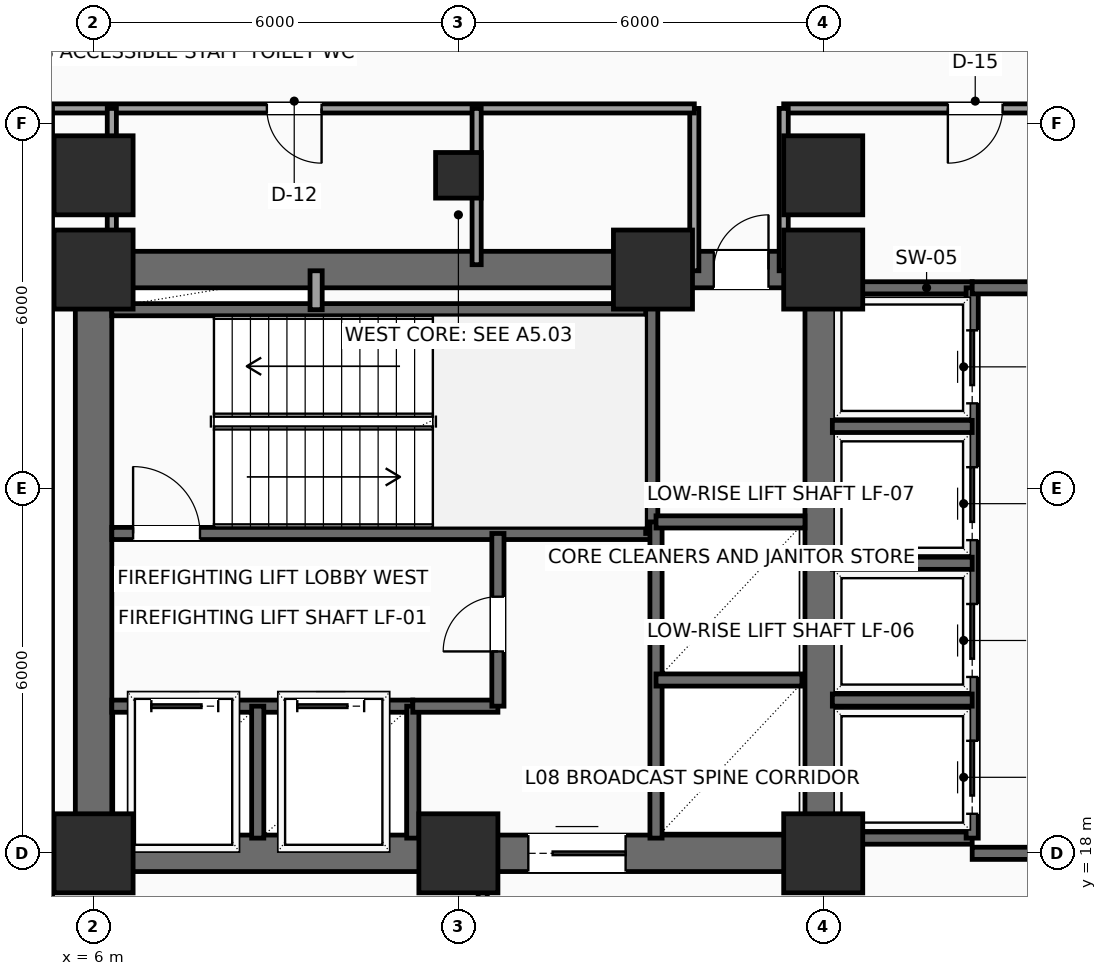
"""IFC4 building model, lengths in metres.
Left out: names, types, materials, properties, quantities, classifications, styles, units other than length and angle.
Written with IfcOpenShell. Run it as: python <this file> out.ifc"""

import sys

from ifc_helpers import new_model, si_unit, direction, frame, frame_2d, origin, origin_2d, place, context, subcontext, project, spatial, rectangle, hollow_rectangle, extrude, element, fill, save


model = new_model("IFC4")
c1 = context("Model", 3, precision=1e-05, world=origin(), true_north=direction((0.0, 1.0)))
c2 = subcontext(c1, "Body", "Model", "MODEL_VIEW")
j1 = project(units=[si_unit("LENGTHUNIT", "METRE"), si_unit("PLANEANGLEUNIT", "RADIAN")], contexts=[c1])
p1 = place(None, origin())
s1 = spatial("IfcSite", under=j1, at=p1, CompositionType="ELEMENT")
p2 = place(p1, origin())
s2 = spatial("IfcBuilding", under=s1, at=p2, CompositionType="ELEMENT")
p3 = place(p2, frame((0.0, 0.0, 40.2)))
s3 = spatial("IfcBuildingStorey", under=s2, at=p3, CompositionType="ELEMENT", Elevation=40.2)
for number, where, z_axis, x_axis in (
    (1, (6.0, 18.0, 0.0), (0.0, 0.0, 1.0), (1.0, 0.0, 0.0)),
    (2, (12.0, 18.0, 0.0), (0.0, 0.0, 1.0), (1.0, 0.0, 0.0)),
    (3, (18.0, 18.0, 0.0), (0.0, 0.0, 1.0), (1.0, 0.0, 0.0)),
    (4, (6.0, 27.6, 0.0), (0.0, 0.0, 1.0), (1.0, 0.0, 0.0)),
    (5, (15.2, 27.6, 0.0), (0.0, 0.0, 1.0), (1.0, 0.0, 0.0)),
    (6, (18.0, 27.6, 0.0), (0.0, 0.0, 1.0), (1.0, 0.0, 0.0)),
    (7, (6.0, 29.15, 0.0), (0.0, 0.0, 1.0), (1.0, 0.0, 0.0)),
):
    element("IfcColumn", number, at=place(p3, frame(where, z_axis=z_axis, x_axis=x_axis)), inside=s3, PredefinedType="COLUMN", context=c2, shape_type="SweptSolid", body=[
        extrude(rectangle(XDim=1.3, YDim=1.3, at=origin_2d()), origin(), (0.0, 0.0, 1.0), 3.9),
    ])
p4 = place(p3, frame((12.0, 29.15, 0.0), z_axis=(0.0, 0.0, 1.0), x_axis=(1.0, 0.0, 0.0)))
e8 = element("IfcColumn", 8, at=p4, inside=s3, PredefinedType="COLUMN", context=c2, shape_type="SweptSolid", body=[
    extrude(hollow_rectangle(XDim=0.75, YDim=0.75, WallThickness=0.035, InnerFilletRadius=0.035, OuterFilletRadius=0.05, at=origin_2d()), origin(), (0.0, 0.0, 1.0), 3.9),
])
p5 = place(p3, frame((18.0, 29.15, 0.0), z_axis=(0.0, 0.0, 1.0), x_axis=(1.0, 0.0, 0.0)))
e9 = element("IfcColumn", 9, at=p5, inside=s3, PredefinedType="COLUMN", context=c2, shape_type="SweptSolid", body=[
    extrude(rectangle(XDim=1.3, YDim=1.3, at=origin_2d()), origin(), (0.0, 0.0, 1.0), 3.9),
])
p6 = place(p3, frame((6.0, 18.0, 0.0), z_axis=(0.0, 0.0, 1.0), x_axis=(1.0, 0.0, 0.0)))
e10 = element("IfcWall", 10, at=p6, inside=s3, PredefinedType="SHEAR", context=c2, shape_type="SweptSolid", body=[
    extrude(rectangle(XDim=12.0, YDim=0.6, at=frame_2d((6.0, 0.0))), origin(), (0.0, 0.0, 1.0), 3.65),
])
p7 = place(p6, frame((7.15, 0.0, 0.0)))
e11 = element("IfcOpeningElement", 11, at=p7, cuts=e10, PredefinedType="OPENING", context=c2, shape_type="SweptSolid", body=[
    extrude(rectangle(XDim=1.6, YDim=2.3, at=frame_2d((0.8, 1.15))), frame((0.0, 0.31, 0.0), z_axis=(0.0, -1.0, 0.0), x_axis=(1.0, 0.0, 0.0)), (0.0, 0.0, 1.0), 0.62),
])
p8 = place(p3, frame((6.0, 27.6, 0.0), z_axis=(0.0, 0.0, 1.0), x_axis=(1.0, 0.0, 0.0)))
e12 = element("IfcWall", 12, at=p8, inside=s3, PredefinedType="SHEAR", context=c2, shape_type="SweptSolid", body=[
    extrude(rectangle(XDim=12.0, YDim=0.6, at=frame_2d((6.0, 0.0))), origin(), (0.0, 0.0, 1.0), 3.65),
])
p9 = place(p8, frame((10.2, 0.0, 0.0)))
e13 = element("IfcOpeningElement", 13, at=p9, cuts=e12, PredefinedType="OPENING", context=c2, shape_type="SweptSolid", body=[
    extrude(rectangle(XDim=0.9, YDim=2.15, at=frame_2d((0.45, 1.075))), frame((0.0, 0.31, 0.0), z_axis=(0.0, -1.0, 0.0), x_axis=(1.0, 0.0, 0.0)), (0.0, 0.0, 1.0), 0.62),
])
for number, where, z_axis, x_axis in (
    (14, (6.0, 18.0, 0.0), (0.0, 0.0, 1.0), (0.0, 1.0, 0.0)),
    (15, (18.0, 18.0, 0.0), (0.0, 0.0, 1.0), (0.0, 1.0, 0.0)),
):
    element("IfcWall", number, at=place(p3, frame(where, z_axis=z_axis, x_axis=x_axis)), inside=s3, PredefinedType="SHEAR", context=c2, shape_type="SweptSolid", body=[
        extrude(rectangle(XDim=9.6, YDim=0.6, at=frame_2d((4.8, 0.0))), origin(), (0.0, 0.0, 1.0), 3.65),
    ])
p10 = place(p3, frame((6.3, 23.26, 0.0), z_axis=(0.0, 0.0, 1.0), x_axis=(1.0, 0.0, 0.0)))
e16 = element("IfcWall", 16, at=p10, inside=s3, PredefinedType="SHEAR", context=c2, shape_type="SweptSolid", body=[
    extrude(rectangle(XDim=8.88, YDim=0.2, at=frame_2d((4.44, 0.0))), origin(), (0.0, 0.0, 1.0), 3.65),
])
p11 = place(p10, frame((0.35, 0.0, 0.0)))
e17 = element("IfcOpeningElement", 17, at=p11, cuts=e16, PredefinedType="OPENING", context=c2, shape_type="SweptSolid", body=[
    extrude(rectangle(XDim=1.1, YDim=2.2, at=frame_2d((0.55, 1.1))), frame((0.0, 0.11, 0.0), z_axis=(0.0, -1.0, 0.0), x_axis=(1.0, 0.0, 0.0)), (0.0, 0.0, 1.0), 0.22),
])
p12 = place(p3, frame((6.3, 26.94, 0.0), z_axis=(0.0, 0.0, 1.0), x_axis=(1.0, 0.0, 0.0)))
e18 = element("IfcWall", 18, at=p12, inside=s3, PredefinedType="SHEAR", context=c2, shape_type="SweptSolid", body=[
    extrude(rectangle(XDim=8.88, YDim=0.2, at=frame_2d((4.44, 0.0))), origin(), (0.0, 0.0, 1.0), 3.65),
])
p13 = place(p3, frame((15.18, 23.26, 0.0), z_axis=(0.0, 0.0, 1.0), x_axis=(0.0, 1.0, 0.0)))
e19 = element("IfcWall", 19, at=p13, inside=s3, PredefinedType="SHEAR", context=c2, shape_type="SweptSolid", body=[
    extrude(rectangle(XDim=4.04, YDim=0.2, at=frame_2d((2.02, 0.0))), origin(), (0.0, 0.0, 1.0), 3.65),
])
p14 = place(p3, frame((6.3, 20.42, 0.0), z_axis=(0.0, 0.0, 1.0), x_axis=(1.0, 0.0, 0.0)))
e20 = element("IfcWall", 20, at=p14, inside=s3, PredefinedType="SHEAR", context=c2, shape_type="SweptSolid", body=[
    extrude(rectangle(XDim=4.95, YDim=0.2, at=frame_2d((2.475, 0.0))), origin(), (0.0, 0.0, 1.0), 3.65),
])
p15 = place(p14, frame((0.65, 0.0, 0.0)))
e21 = element("IfcOpeningElement", 21, at=p15, cuts=e20, PredefinedType="OPENING", context=c2, shape_type="SweptSolid", body=[
    extrude(rectangle(XDim=1.1, YDim=2.2, at=frame_2d((0.55, 1.1))), frame((0.0, 0.11, 0.0), z_axis=(0.0, -1.0, 0.0), x_axis=(1.0, 0.0, 0.0)), (0.0, 0.0, 1.0), 0.22),
])
p16 = place(p14, frame((3.05, 0.0, 0.0)))
e22 = element("IfcOpeningElement", 22, at=p16, cuts=e20, PredefinedType="OPENING", context=c2, shape_type="SweptSolid", body=[
    extrude(rectangle(XDim=1.1, YDim=2.2, at=frame_2d((0.55, 1.1))), frame((0.0, 0.11, 0.0), z_axis=(0.0, -1.0, 0.0), x_axis=(1.0, 0.0, 0.0)), (0.0, 0.0, 1.0), 0.22),
])
for number, where, z_axis, x_axis in (
    (23, (8.7, 18.25, 0.0), (0.0, 0.0, 1.0), (0.0, 1.0, 0.0)),
    (24, (11.25, 18.25, 0.0), (0.0, 0.0, 1.0), (0.0, 1.0, 0.0)),
):
    element("IfcWall", number, at=place(p3, frame(where, z_axis=z_axis, x_axis=x_axis)), inside=s3, PredefinedType="SHEAR", context=c2, shape_type="SweptSolid", body=[
        extrude(rectangle(XDim=2.17, YDim=0.2, at=frame_2d((1.085, 0.0))), origin(), (0.0, 0.0, 1.0), 3.65),
    ])
p17 = place(p3, frame((11.25, 20.42, 0.0), z_axis=(0.0, 0.0, 1.0), x_axis=(1.0, 0.0, 0.0)))
e25 = element("IfcWall", 25, at=p17, inside=s3, PredefinedType="SHEAR", context=c2, shape_type="SweptSolid", body=[
    extrude(rectangle(XDim=1.4, YDim=0.2, at=frame_2d((0.7, 0.0))), origin(), (0.0, 0.0, 1.0), 3.65),
])
p18 = place(p3, frame((12.65, 20.42, 0.0), z_axis=(0.0, 0.0, 1.0), x_axis=(0.0, 1.0, 0.0)))
e26 = element("IfcWall", 26, at=p18, inside=s3, PredefinedType="SHEAR", context=c2, shape_type="SweptSolid", body=[
    extrude(rectangle(XDim=2.84, YDim=0.2, at=frame_2d((1.42, 0.0))), origin(), (0.0, 0.0, 1.0), 3.65),
])
p19 = place(p18, frame((0.9, 0.0, 0.0)))
e27 = element("IfcOpeningElement", 27, at=p19, cuts=e26, PredefinedType="OPENING", context=c2, shape_type="SweptSolid", body=[
    extrude(rectangle(XDim=0.9, YDim=2.15, at=frame_2d((0.45, 1.075))), frame((0.0, 0.11, 0.0), z_axis=(0.0, -1.0, 0.0), x_axis=(1.0, 0.0, 0.0)), (0.0, 0.0, 1.0), 0.22),
])
p20 = place(p3, frame((9.66, 26.94, 0.0), z_axis=(0.0, 0.0, 1.0), x_axis=(0.0, 1.0, 0.0)))
e28 = element("IfcWall", 28, at=p20, inside=s3, PredefinedType="SOLIDWALL", context=c2, shape_type="SweptSolid", body=[
    extrude(rectangle(XDim=0.64, YDim=0.2, at=frame_2d((0.32, 0.0))), origin(), (0.0, 0.0, 1.0), 3.65),
])
p21 = place(p3, frame((15.25, 18.25, 0.0), z_axis=(0.0, 0.0, 1.0), x_axis=(0.0, 1.0, 0.0)))
e29 = element("IfcWall", 29, at=p21, inside=s3, PredefinedType="SHEAR", context=c2, shape_type="SweptSolid", body=[
    extrude(rectangle(XDim=5.2, YDim=0.2, at=frame_2d((2.6, 0.0))), origin(), (0.0, 0.0, 1.0), 3.65),
])
p22 = place(p3, frame((15.25, 20.85, 0.0), z_axis=(0.0, 0.0, 1.0), x_axis=(1.0, 0.0, 0.0)))
e30 = element("IfcWall", 30, at=p22, inside=s3, PredefinedType="SHEAR", context=c2, shape_type="SweptSolid", body=[
    extrude(rectangle(XDim=2.4, YDim=0.2, at=frame_2d((1.2, 0.0))), origin(), (0.0, 0.0, 1.0), 3.65),
])
p23 = place(p3, frame((15.25, 23.45, 0.0), z_axis=(0.0, 0.0, 1.0), x_axis=(1.0, 0.0, 0.0)))
e31 = element("IfcWall", 31, at=p23, inside=s3, PredefinedType="SHEAR", context=c2, shape_type="SweptSolid", body=[
    extrude(rectangle(XDim=2.45, YDim=0.2, at=frame_2d((1.225, 0.0))), origin(), (0.0, 0.0, 1.0), 3.65),
])
for number, where, z_axis, x_axis in (
    (32, (18.1, 27.3, 0.0), (0.0, 0.0, 1.0), (1.0, 0.0, 0.0)),
    (33, (18.1, 18.25, 0.0), (0.0, 0.0, 1.0), (1.0, 0.0, 0.0)),
):
    element("IfcWall", number, at=place(p3, frame(where, z_axis=z_axis, x_axis=x_axis)), inside=s3, PredefinedType="SHEAR", context=c2, shape_type="SweptSolid", body=[
        extrude(rectangle(XDim=2.35, YDim=0.2, at=frame_2d((1.175, 0.0))), origin(), (0.0, 0.0, 1.0), 3.65),
    ])
p24 = place(p3, frame((20.45, 18.25, 0.0), z_axis=(0.0, 0.0, 1.0), x_axis=(0.0, 1.0, 0.0)))
e34 = element("IfcWall", 34, at=p24, inside=s3, PredefinedType="SHEAR", context=c2, shape_type="SweptSolid", body=[
    extrude(rectangle(XDim=9.05, YDim=0.2, at=frame_2d((4.525, 0.0))), origin(), (0.0, 0.0, 1.0), 3.65),
])
p25 = place(p24, frame((0.4, 0.0, 0.0)))
e35 = element("IfcOpeningElement", 35, at=p25, cuts=e34, PredefinedType="OPENING", context=c2, shape_type="SweptSolid", body=[
    extrude(rectangle(XDim=1.2, YDim=2.2, at=frame_2d((0.6, 1.1))), frame((0.0, 0.11, 0.0), z_axis=(0.0, -1.0, 0.0), x_axis=(1.0, 0.0, 0.0)), (0.0, 0.0, 1.0), 0.22),
])
p26 = place(p24, frame((2.65, 0.0, 0.0)))
e36 = element("IfcOpeningElement", 36, at=p26, cuts=e34, PredefinedType="OPENING", context=c2, shape_type="SweptSolid", body=[
    extrude(rectangle(XDim=1.2, YDim=2.2, at=frame_2d((0.6, 1.1))), frame((0.0, 0.11, 0.0), z_axis=(0.0, -1.0, 0.0), x_axis=(1.0, 0.0, 0.0)), (0.0, 0.0, 1.0), 0.22),
])
p27 = place(p24, frame((4.9, 0.0, 0.0)))
e37 = element("IfcOpeningElement", 37, at=p27, cuts=e34, PredefinedType="OPENING", context=c2, shape_type="SweptSolid", body=[
    extrude(rectangle(XDim=1.2, YDim=2.2, at=frame_2d((0.6, 1.1))), frame((0.0, 0.11, 0.0), z_axis=(0.0, -1.0, 0.0), x_axis=(1.0, 0.0, 0.0)), (0.0, 0.0, 1.0), 0.22),
])
p28 = place(p24, frame((7.15, 0.0, 0.0)))
e38 = element("IfcOpeningElement", 38, at=p28, cuts=e34, PredefinedType="OPENING", context=c2, shape_type="SweptSolid", body=[
    extrude(rectangle(XDim=1.2, YDim=2.2, at=frame_2d((0.6, 1.1))), frame((0.0, 0.11, 0.0), z_axis=(0.0, -1.0, 0.0), x_axis=(1.0, 0.0, 0.0)), (0.0, 0.0, 1.0), 0.22),
])
for number, where, z_axis, x_axis in (
    (39, (18.15, 20.52, 0.0), (0.0, 0.0, 1.0), (1.0, 0.0, 0.0)),
    (40, (18.15, 22.77, 0.0), (0.0, 0.0, 1.0), (1.0, 0.0, 0.0)),
    (41, (18.15, 25.02, 0.0), (0.0, 0.0, 1.0), (1.0, 0.0, 0.0)),
):
    element("IfcWall", number, at=place(p3, frame(where, z_axis=z_axis, x_axis=x_axis)), inside=s3, PredefinedType="SHEAR", context=c2, shape_type="SweptSolid", body=[
        extrude(rectangle(XDim=2.3, YDim=0.2, at=frame_2d((1.15, 0.0))), origin(), (0.0, 0.0, 1.0), 3.65),
    ])
p29 = place(p3, frame((20.45, 18.0, 0.0), z_axis=(0.0, 0.0, 1.0), x_axis=(1.0, 0.0, 0.0)))
e42 = element("IfcWall", 42, at=p29, inside=s3, PredefinedType="SHEAR", context=c2, shape_type="SweptSolid", body=[
    extrude(rectangle(XDim=3.5, YDim=0.2, at=frame_2d((1.75, 0.0))), origin(), (0.0, 0.0, 1.0), 3.65),
])
p30 = place(p29, frame((0.95, 0.0, 0.0)))
e43 = element("IfcOpeningElement", 43, at=p30, cuts=e42, PredefinedType="OPENING", context=c2, shape_type="SweptSolid", body=[
    extrude(rectangle(XDim=1.6, YDim=2.3, at=frame_2d((0.8, 1.15))), frame((0.0, 0.11, 0.0), z_axis=(0.0, -1.0, 0.0), x_axis=(1.0, 0.0, 0.0)), (0.0, 0.0, 1.0), 0.22),
])
p31 = place(p3, frame((20.45, 27.3, 0.0), z_axis=(0.0, 0.0, 1.0), x_axis=(1.0, 0.0, 0.0)))
e44 = element("IfcWall", 44, at=p31, inside=s3, PredefinedType="SHEAR", context=c2, shape_type="SweptSolid", body=[
    extrude(rectangle(XDim=3.5, YDim=0.2, at=frame_2d((1.75, 0.0))), origin(), (0.0, 0.0, 1.0), 3.65),
])
p32 = place(p3, frame((23.7, 30.25, 0.0), z_axis=(0.0, 0.0, 1.0), x_axis=(-1.0, 0.0, 0.0)))
e45 = element("IfcWall", 45, at=p32, inside=s3, PredefinedType="PARTITIONING", context=c2, shape_type="SweptSolid", body=[
    extrude(rectangle(XDim=6.35, YDim=0.15, at=frame_2d((3.175, 0.0))), origin(), (0.0, 0.0, 1.0), 3.65),
])
p33 = place(p32, frame((2.75, 0.0, 0.0)))
e46 = element("IfcOpeningElement", 46, at=p33, cuts=e45, PredefinedType="OPENING", context=c2, shape_type="SweptSolid", body=[
    extrude(rectangle(XDim=0.9, YDim=2.1, at=frame_2d((0.45, 1.05))), frame((0.0, 0.085, 0.0), z_axis=(0.0, -1.0, 0.0), x_axis=(1.0, 0.0, 0.0)), (0.0, 0.0, 1.0), 0.17),
])
for number, where, z_axis, x_axis in (
    (47, (17.35, 30.25, 0.0), (0.0, 0.0, 1.0), (0.0, -1.0, 0.0)),
    (48, (15.88, 27.58, 0.0), (0.0, 0.0, 1.0), (0.0, 1.0, 0.0)),
):
    element("IfcWall", number, at=place(p3, frame(where, z_axis=z_axis, x_axis=x_axis)), inside=s3, PredefinedType="PARTITIONING", context=c2, shape_type="SweptSolid", body=[
        extrude(rectangle(XDim=2.67, YDim=0.15, at=frame_2d((1.335, 0.0))), origin(), (0.0, 0.0, 1.0), 3.65),
    ])
p34 = place(p3, frame((15.88, 30.25, 0.0), z_axis=(0.0, 0.0, 1.0), x_axis=(-1.0, 0.0, 0.0)))
e49 = element("IfcWall", 49, at=p34, inside=s3, PredefinedType="PARTITIONING", context=c2, shape_type="SweptSolid", body=[
    extrude(rectangle(XDim=10.63, YDim=0.15, at=frame_2d((5.315, 0.0))), origin(), (0.0, 0.0, 1.0), 3.65),
])
p35 = place(p34, frame((6.13, 0.0, 0.0)))
e50 = element("IfcOpeningElement", 50, at=p35, cuts=e49, PredefinedType="OPENING", context=c2, shape_type="SweptSolid", body=[
    extrude(rectangle(XDim=0.9, YDim=2.1, at=frame_2d((0.45, 1.05))), frame((0.0, 0.085, 0.0), z_axis=(0.0, -1.0, 0.0), x_axis=(1.0, 0.0, 0.0)), (0.0, 0.0, 1.0), 0.17),
])
p36 = place(p3, frame((5.25, 30.25, 0.0), z_axis=(0.0, 0.0, 1.0), x_axis=(0.0, -1.0, 0.0)))
e51 = element("IfcWall", 51, at=p36, inside=s3, PredefinedType="PARTITIONING", context=c2, shape_type="SweptSolid", body=[
    extrude(rectangle(XDim=14.1, YDim=0.15, at=frame_2d((7.05, 0.0))), origin(), (0.0, 0.0, 1.0), 3.65),
])
p37 = place(p3, frame((12.4, 16.15, 0.0), z_axis=(0.0, 0.0, 1.0), x_axis=(0.0, 1.0, 0.0)))
e52 = element("IfcWall", 52, at=p37, inside=s3, PredefinedType="PARTITIONING", context=c2, shape_type="SweptSolid", body=[
    extrude(rectangle(XDim=1.8, YDim=0.15, at=frame_2d((0.9, 0.0))), origin(), (0.0, 0.0, 1.0), 3.65),
])
for number, where, z_axis, x_axis in (
    (53, (6.3, 27.68, 0.0), (0.0, 0.0, 1.0), (0.0, 1.0, 0.0)),
    (54, (12.3, 27.68, 0.0), (0.0, 0.0, 1.0), (0.0, 1.0, 0.0)),
):
    element("IfcWall", number, at=place(p3, frame(where, z_axis=z_axis, x_axis=x_axis)), inside=s3, PredefinedType="PARTITIONING", context=c2, shape_type="SweptSolid", body=[
        extrude(rectangle(XDim=2.57, YDim=0.15, at=frame_2d((1.285, 0.0))), origin(), (0.0, 0.0, 1.0), 2.992),
    ])
p38 = place(p7, origin())
e55 = element("IfcDoor", 55, at=p38, inside=s3, OperationType="DOUBLE_DOOR_SLIDING", PredefinedType="DOOR", context=c2, shape_type="SweptSolid", body=[
    extrude(rectangle(XDim=1.6, YDim=2.3, at=frame_2d((0.8, 1.15))), frame((0.0, 0.025, 0.0), z_axis=(0.0, -1.0, 0.0), x_axis=(1.0, 0.0, 0.0)), (0.0, 0.0, 1.0), 0.05),
])
fill(e11, e55)
p39 = place(p9, origin())
e56 = element("IfcDoor", 56, at=p39, inside=s3, OperationType="SINGLE_SWING_RIGHT", PredefinedType="DOOR", context=c2, shape_type="SweptSolid", body=[
    extrude(rectangle(XDim=0.9, YDim=2.15, at=frame_2d((0.45, 1.075))), frame((0.0, 0.025, 0.0), z_axis=(0.0, -1.0, 0.0), x_axis=(1.0, 0.0, 0.0)), (0.0, 0.0, 1.0), 0.05),
])
fill(e13, e56)
p40 = place(p11, origin())
e57 = element("IfcDoor", 57, at=p40, inside=s3, OperationType="SINGLE_SWING_LEFT", PredefinedType="DOOR", context=c2, shape_type="SweptSolid", body=[
    extrude(rectangle(XDim=1.1, YDim=2.2, at=frame_2d((0.55, 1.1))), frame((0.0, 0.025, 0.0), z_axis=(0.0, -1.0, 0.0), x_axis=(1.0, 0.0, 0.0)), (0.0, 0.0, 1.0), 0.05),
])
fill(e17, e57)
p41 = place(p15, origin())
e58 = element("IfcDoor", 58, at=p41, inside=s3, OperationType="SLIDING_TO_LEFT", PredefinedType="DOOR", context=c2, shape_type="SweptSolid", body=[
    extrude(rectangle(XDim=1.1, YDim=2.2, at=frame_2d((0.55, 1.1))), frame((0.0, 0.025, 0.0), z_axis=(0.0, -1.0, 0.0), x_axis=(1.0, 0.0, 0.0)), (0.0, 0.0, 1.0), 0.05),
])
fill(e21, e58)
p42 = place(p16, origin())
e59 = element("IfcDoor", 59, at=p42, inside=s3, OperationType="SLIDING_TO_LEFT", PredefinedType="DOOR", context=c2, shape_type="SweptSolid", body=[
    extrude(rectangle(XDim=1.1, YDim=2.2, at=frame_2d((0.55, 1.1))), frame((0.0, 0.025, 0.0), z_axis=(0.0, -1.0, 0.0), x_axis=(1.0, 0.0, 0.0)), (0.0, 0.0, 1.0), 0.05),
])
fill(e22, e59)
p43 = place(p19, origin())
e60 = element("IfcDoor", 60, at=p43, inside=s3, OperationType="SINGLE_SWING_LEFT", PredefinedType="DOOR", context=c2, shape_type="SweptSolid", body=[
    extrude(rectangle(XDim=0.9, YDim=2.15, at=frame_2d((0.45, 1.075))), frame((0.0, 0.025, 0.0), z_axis=(0.0, -1.0, 0.0), x_axis=(1.0, 0.0, 0.0)), (0.0, 0.0, 1.0), 0.05),
])
fill(e27, e60)
p44 = place(p25, origin())
e61 = element("IfcDoor", 61, at=p44, inside=s3, OperationType="SLIDING_TO_RIGHT", PredefinedType="DOOR", context=c2, shape_type="SweptSolid", body=[
    extrude(rectangle(XDim=1.2, YDim=2.2, at=frame_2d((0.6, 1.1))), frame((0.0, 0.025, 0.0), z_axis=(0.0, -1.0, 0.0), x_axis=(1.0, 0.0, 0.0)), (0.0, 0.0, 1.0), 0.05),
])
fill(e35, e61)
p45 = place(p26, origin())
e62 = element("IfcDoor", 62, at=p45, inside=s3, OperationType="SLIDING_TO_RIGHT", PredefinedType="DOOR", context=c2, shape_type="SweptSolid", body=[
    extrude(rectangle(XDim=1.2, YDim=2.2, at=frame_2d((0.6, 1.1))), frame((0.0, 0.025, 0.0), z_axis=(0.0, -1.0, 0.0), x_axis=(1.0, 0.0, 0.0)), (0.0, 0.0, 1.0), 0.05),
])
fill(e36, e62)
p46 = place(p27, origin())
e63 = element("IfcDoor", 63, at=p46, inside=s3, OperationType="SLIDING_TO_RIGHT", PredefinedType="DOOR", context=c2, shape_type="SweptSolid", body=[
    extrude(rectangle(XDim=1.2, YDim=2.2, at=frame_2d((0.6, 1.1))), frame((0.0, 0.025, 0.0), z_axis=(0.0, -1.0, 0.0), x_axis=(1.0, 0.0, 0.0)), (0.0, 0.0, 1.0), 0.05),
])
fill(e37, e63)
p47 = place(p28, origin())
e64 = element("IfcDoor", 64, at=p47, inside=s3, OperationType="SLIDING_TO_RIGHT", PredefinedType="DOOR", context=c2, shape_type="SweptSolid", body=[
    extrude(rectangle(XDim=1.2, YDim=2.2, at=frame_2d((0.6, 1.1))), frame((0.0, 0.025, 0.0), z_axis=(0.0, -1.0, 0.0), x_axis=(1.0, 0.0, 0.0)), (0.0, 0.0, 1.0), 0.05),
])
fill(e38, e64)
p48 = place(p33, origin())
e65 = element("IfcDoor", 65, at=p48, inside=s3, OperationType="SINGLE_SWING_RIGHT", PredefinedType="DOOR", context=c2, shape_type="SweptSolid", body=[
    extrude(rectangle(XDim=0.9, YDim=2.1, at=frame_2d((0.45, 1.05))), frame((0.0, 0.025, 0.0), z_axis=(0.0, -1.0, 0.0), x_axis=(1.0, 0.0, 0.0)), (0.0, 0.0, 1.0), 0.05),
])
fill(e46, e65)
p49 = place(p35, origin())
e66 = element("IfcDoor", 66, at=p49, inside=s3, OperationType="SINGLE_SWING_LEFT", PredefinedType="DOOR", context=c2, shape_type="SweptSolid", body=[
    extrude(rectangle(XDim=0.9, YDim=2.1, at=frame_2d((0.45, 1.05))), frame((0.0, 0.025, 0.0), z_axis=(0.0, -1.0, 0.0), x_axis=(1.0, 0.0, 0.0)), (0.0, 0.0, 1.0), 0.05),
])
fill(e50, e66)
save(model, sys.argv[1])
